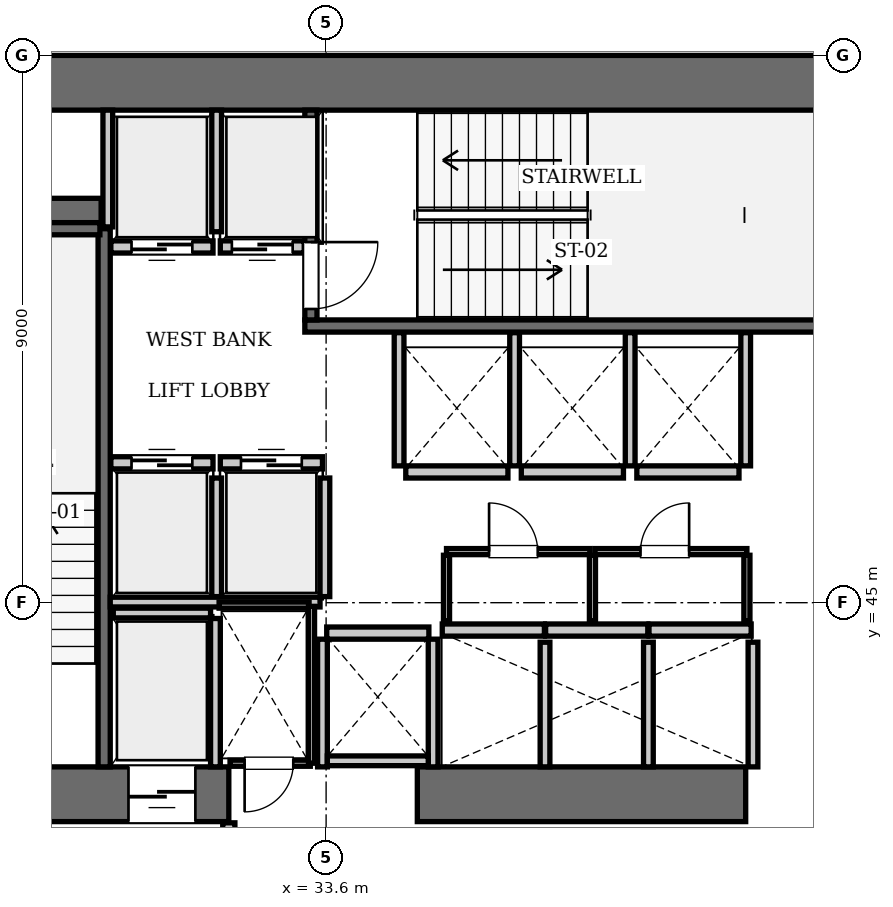
"""IFC4 building model, lengths in metres.
Left out: names, types, materials, properties, quantities, classifications, styles, units other than length and angle.
Written with IfcOpenShell. Run it as: python <this file> out.ifc"""

import sys

from ifc_helpers import new_model, si_unit, direction, frame, frame_2d, origin, place, context, subcontext, project, spatial, rectangle, extrude, element, fill, save


model = new_model("IFC4")
c1 = context("Model", 3, precision=1e-05, world=origin(), true_north=direction((0.0, 1.0)))
c2 = subcontext(c1, "Body", "Model", "MODEL_VIEW")
j1 = project(units=[si_unit("LENGTHUNIT", "METRE"), si_unit("PLANEANGLEUNIT", "RADIAN")], contexts=[c1])
p1 = place(None, origin())
s1 = spatial("IfcSite", under=j1, at=p1, CompositionType="ELEMENT")
p2 = place(p1, origin())
s2 = spatial("IfcBuilding", under=s1, at=p2, CompositionType="ELEMENT")
p3 = place(p2, frame((0.0, 0.0, 26.95)))
s3 = spatial("IfcBuildingStorey", under=s2, at=p3, CompositionType="ELEMENT", Elevation=26.95)
p4 = place(p3, frame((25.2, 53.55, 0.0), z_axis=(0.0, 0.0, 1.0), x_axis=(1.0, 0.0, 0.0)))
e1 = element("IfcWall", 1, at=p4, inside=s3, PredefinedType="SHEAR", context=c2, shape_type="SweptSolid", body=[
    extrude(rectangle(XDim=25.2, YDim=0.9, at=frame_2d((12.6, 0.0))), origin(), (0.0, 0.0, 1.0), 3.85),
])
p5 = place(p3, frame((25.2, 41.85, 0.0), z_axis=(0.0, 0.0, 1.0), x_axis=(1.0, 0.0, 0.0)))
e2 = element("IfcWall", 2, at=p5, inside=s3, PredefinedType="SHEAR", context=c2, shape_type="SweptSolid", body=[
    extrude(rectangle(XDim=6.8, YDim=0.9, at=frame_2d((3.4, 0.0))), origin(), (0.0, 0.0, 1.0), 3.85),
])
p6 = place(p5, frame((1.65, 0.0, 0.0)))
e3 = element("IfcOpeningElement", 3, at=p6, cuts=e2, PredefinedType="OPENING", context=c2, shape_type="SweptSolid", body=[
    extrude(rectangle(XDim=1.15, YDim=2.15, at=frame_2d((0.575, 1.075))), frame((0.0, 0.46, 0.0), z_axis=(0.0, -1.0, 0.0), x_axis=(1.0, 0.0, 0.0)), (0.0, 0.0, 1.0), 0.92),
])
p7 = place(p5, frame((5.15, 0.0, 0.0)))
e4 = element("IfcOpeningElement", 4, at=p7, cuts=e2, PredefinedType="OPENING", context=c2, shape_type="SweptSolid", body=[
    extrude(rectangle(XDim=1.1, YDim=2.2, at=frame_2d((0.55, 1.1))), frame((0.0, 0.46, 0.0), z_axis=(0.0, -1.0, 0.0), x_axis=(1.0, 0.0, 0.0)), (0.0, 0.0, 1.0), 0.92),
])
p8 = place(p3, frame((35.1, 41.85, 0.0), z_axis=(0.0, 0.0, 1.0), x_axis=(1.0, 0.0, 0.0)))
e5 = element("IfcWall", 5, at=p8, inside=s3, PredefinedType="SHEAR", context=c2, shape_type="SweptSolid", body=[
    extrude(rectangle(XDim=5.4, YDim=0.9, at=frame_2d((2.7, 0.0))), origin(), (0.0, 0.0, 1.0), 3.85),
])
p9 = place(p3, frame((26.1, 51.4, 0.0), z_axis=(0.0, 0.0, 1.0), x_axis=(1.0, 0.0, 0.0)))
e6 = element("IfcWall", 6, at=p9, inside=s3, PredefinedType="SHEAR", context=c2, shape_type="SweptSolid", body=[
    extrude(rectangle(XDim=3.8, YDim=0.5, at=frame_2d((1.9, 0.0))), origin(), (0.0, 0.0, 1.0), 3.85),
])
p10 = place(p3, frame((29.95, 42.3, 0.0), z_axis=(0.0, 0.0, 1.0), x_axis=(0.0, 1.0, 0.0)))
e7 = element("IfcWall", 7, at=p10, inside=s3, PredefinedType="SOLIDWALL", context=c2, shape_type="SweptSolid", body=[
    extrude(rectangle(XDim=8.85, YDim=0.2, at=frame_2d((4.425, 0.0))), origin(), (0.0, 0.0, 1.0), 3.61),
])
p11 = place(p3, frame((26.38, 51.15, 0.0), z_axis=(0.0, 0.0, 1.0), x_axis=(1.0, 0.0, 0.0)))
e8 = element("IfcWall", 8, at=p11, inside=s3, PredefinedType="SOLIDWALL", context=c2, shape_type="SweptSolid", body=[
    extrude(rectangle(XDim=3.5, YDim=0.2, at=frame_2d((1.75, 0.0))), origin(), (0.0, 0.0, 1.0), 3.61),
])
p12 = place(p3, frame((33.25, 49.55, 0.0), z_axis=(0.0, 0.0, 1.0), x_axis=(1.0, 0.0, 0.0)))
e9 = element("IfcWall", 9, at=p12, inside=s3, PredefinedType="SOLIDWALL", context=c2, shape_type="SweptSolid", body=[
    extrude(rectangle(XDim=9.1, YDim=0.2, at=frame_2d((4.55, 0.0))), origin(), (0.0, 0.0, 1.0), 3.61),
])
p13 = place(p3, frame((33.35, 49.65, 0.0), z_axis=(0.0, 0.0, 1.0), x_axis=(0.0, 1.0, 0.0)))
e10 = element("IfcWall", 10, at=p13, inside=s3, PredefinedType="SOLIDWALL", context=c2, shape_type="SweptSolid", body=[
    extrude(rectangle(XDim=3.45, YDim=0.2, at=frame_2d((1.725, 0.0))), origin(), (0.0, 0.0, 1.0), 3.61),
])
p14 = place(p13, frame((0.18, 0.0, 0.0)))
e11 = element("IfcOpeningElement", 11, at=p14, cuts=e10, PredefinedType="OPENING", context=c2, shape_type="SweptSolid", body=[
    extrude(rectangle(XDim=1.1, YDim=2.15, at=frame_2d((0.55, 1.075))), frame((0.0, 0.11, 0.0), z_axis=(0.0, -1.0, 0.0), x_axis=(1.0, 0.0, 0.0)), (0.0, 0.0, 1.0), 0.22),
])
p15 = place(p3, frame((30.06, 47.3, 0.0), z_axis=(0.0, 0.0, 1.0), x_axis=(1.0, 0.0, 0.0)))
e12 = element("IfcWall", 12, at=p15, inside=s3, PredefinedType="SOLIDWALL", context=c2, shape_type="SweptSolid", body=[
    extrude(rectangle(XDim=1.68, YDim=0.2, at=frame_2d((0.84, 0.0))), origin(), (0.0, 0.0, 1.0), 3.61),
])
p16 = place(p15, frame((0.34, 0.0, 0.0)))
e13 = element("IfcOpeningElement", 13, at=p16, cuts=e12, PredefinedType="OPENING", context=c2, shape_type="SweptSolid", body=[
    extrude(rectangle(XDim=1.0, YDim=2.15, at=frame_2d((0.5, 1.075))), frame((0.0, 0.11, 0.0), z_axis=(0.0, -1.0, 0.0), x_axis=(1.0, 0.0, 0.0)), (0.0, 0.0, 1.0), 0.22),
])
p17 = place(p3, frame((31.86, 47.3, 0.0), z_axis=(0.0, 0.0, 1.0), x_axis=(1.0, 0.0, 0.0)))
e14 = element("IfcWall", 14, at=p17, inside=s3, PredefinedType="SOLIDWALL", context=c2, shape_type="SweptSolid", body=[
    extrude(rectangle(XDim=1.68, YDim=0.2, at=frame_2d((0.84, 0.0))), origin(), (0.0, 0.0, 1.0), 3.61),
])
p18 = place(p17, frame((0.34, 0.0, 0.0)))
e15 = element("IfcOpeningElement", 15, at=p18, cuts=e14, PredefinedType="OPENING", context=c2, shape_type="SweptSolid", body=[
    extrude(rectangle(XDim=1.0, YDim=2.15, at=frame_2d((0.5, 1.075))), frame((0.0, 0.11, 0.0), z_axis=(0.0, -1.0, 0.0), x_axis=(1.0, 0.0, 0.0)), (0.0, 0.0, 1.0), 0.22),
])
p19 = place(p3, frame((30.06, 50.85, 0.0), z_axis=(0.0, 0.0, 1.0), x_axis=(1.0, 0.0, 0.0)))
e16 = element("IfcWall", 16, at=p19, inside=s3, PredefinedType="SOLIDWALL", context=c2, shape_type="SweptSolid", body=[
    extrude(rectangle(XDim=1.68, YDim=0.2, at=frame_2d((0.84, 0.0))), origin(), (0.0, 0.0, 1.0), 3.61),
])
p20 = place(p19, frame((0.34, 0.0, 0.0)))
e17 = element("IfcOpeningElement", 17, at=p20, cuts=e16, PredefinedType="OPENING", context=c2, shape_type="SweptSolid", body=[
    extrude(rectangle(XDim=1.0, YDim=2.15, at=frame_2d((0.5, 1.075))), frame((0.0, 0.11, 0.0), z_axis=(0.0, -1.0, 0.0), x_axis=(1.0, 0.0, 0.0)), (0.0, 0.0, 1.0), 0.22),
])
p21 = place(p3, frame((31.86, 50.85, 0.0), z_axis=(0.0, 0.0, 1.0), x_axis=(1.0, 0.0, 0.0)))
e18 = element("IfcWall", 18, at=p21, inside=s3, PredefinedType="SOLIDWALL", context=c2, shape_type="SweptSolid", body=[
    extrude(rectangle(XDim=1.38, YDim=0.2, at=frame_2d((0.69, 0.0))), origin(), (0.0, 0.0, 1.0), 3.61),
])
p22 = place(p21, frame((0.19, 0.0, 0.0)))
e19 = element("IfcOpeningElement", 19, at=p22, cuts=e18, PredefinedType="OPENING", context=c2, shape_type="SweptSolid", body=[
    extrude(rectangle(XDim=1.0, YDim=2.15, at=frame_2d((0.5, 1.075))), frame((0.0, 0.11, 0.0), z_axis=(0.0, -1.0, 0.0), x_axis=(1.0, 0.0, 0.0)), (0.0, 0.0, 1.0), 0.22),
])
for number, where, z_axis, x_axis in (
    (20, (35.51, 44.55, 0.0), (0.0, 0.0, 1.0), (1.0, 0.0, 0.0)),
    (21, (37.21, 44.55, 0.0), (0.0, 0.0, 1.0), (1.0, 0.0, 0.0)),
):
    element("IfcWall", number, at=place(p3, frame(where, z_axis=z_axis, x_axis=x_axis)), inside=s3, PredefinedType="SOLIDWALL", context=c2, shape_type="SweptSolid", body=[
        extrude(rectangle(XDim=1.68, YDim=0.2, at=frame_2d((0.84, 0.0))), origin(), (0.0, 0.0, 1.0), 3.61),
    ])
for number, where, z_axis, x_axis in (
    (22, (38.91, 44.55, 0.0), (0.0, 0.0, 1.0), (1.0, 0.0, 0.0)),
    (23, (34.91, 47.15, 0.0), (0.0, 0.0, 1.0), (1.0, 0.0, 0.0)),
):
    element("IfcWall", number, at=place(p3, frame(where, z_axis=z_axis, x_axis=x_axis)), inside=s3, PredefinedType="SOLIDWALL", context=c2, shape_type="SweptSolid", body=[
        extrude(rectangle(XDim=1.68, YDim=0.2, at=frame_2d((0.84, 0.0))), origin(), (0.0, 0.0, 1.0), 3.61),
    ])
for number, where, z_axis, x_axis in (
    (24, (36.81, 47.15, 0.0), (0.0, 0.0, 1.0), (1.0, 0.0, 0.0)),
    (25, (38.71, 47.15, 0.0), (0.0, 0.0, 1.0), (1.0, 0.0, 0.0)),
    (26, (33.61, 44.5, 0.0), (0.0, 0.0, 1.0), (1.0, 0.0, 0.0)),
):
    element("IfcWall", number, at=place(p3, frame(where, z_axis=z_axis, x_axis=x_axis)), inside=s3, PredefinedType="SOLIDWALL", context=c2, shape_type="SweptSolid", body=[
        extrude(rectangle(XDim=1.68, YDim=0.2, at=frame_2d((0.84, 0.0))), origin(), (0.0, 0.0, 1.0), 3.61),
    ])
p23 = place(p3, frame((30.1, 44.83, 0.0), z_axis=(0.0, 0.0, 1.0), x_axis=(1.0, 0.0, 0.0)))
e27 = element("IfcWall", 27, at=p23, inside=s3, PredefinedType="SOLIDWALL", context=c2, shape_type="SweptSolid", body=[
    extrude(rectangle(XDim=1.6, YDim=0.16, at=frame_2d((0.8, 0.0))), origin(), (0.0, 0.0, 1.0), 3.61),
])
p24 = place(p3, frame((31.78, 42.3, 0.0), z_axis=(0.0, 0.0, 1.0), x_axis=(0.0, 1.0, 0.0)))
e28 = element("IfcWall", 28, at=p24, inside=s3, PredefinedType="SOLIDWALL", context=c2, shape_type="SweptSolid", body=[
    extrude(rectangle(XDim=2.44, YDim=0.16, at=frame_2d((1.22, 0.0))), origin(), (0.0, 0.0, 1.0), 3.61),
])
for number, where, z_axis, x_axis in (
    (29, (31.8, 45.1, 0.0), (0.0, 0.0, 1.0), (0.0, 1.0, 0.0)),
    (30, (33.58, 45.1, 0.0), (0.0, 0.0, 1.0), (0.0, 1.0, 0.0)),
):
    element("IfcWall", number, at=place(p3, frame(where, z_axis=z_axis, x_axis=x_axis)), inside=s3, PredefinedType="SOLIDWALL", context=c2, shape_type="SweptSolid", body=[
        extrude(rectangle(XDim=1.95, YDim=0.16, at=frame_2d((0.975, 0.0))), origin(), (0.0, 0.0, 1.0), 3.61),
    ])
p25 = place(p3, frame((30.05, 45.01, 0.0), z_axis=(0.0, 0.0, 1.0), x_axis=(1.0, 0.0, 0.0)))
e31 = element("IfcWall", 31, at=p25, inside=s3, PredefinedType="SOLIDWALL", context=c2, shape_type="SweptSolid", body=[
    extrude(rectangle(XDim=3.45, YDim=0.16, at=frame_2d((1.725, 0.0))), origin(), (0.0, 0.0, 1.0), 3.61),
])
p26 = place(p3, frame((30.01, 51.18, 0.0), z_axis=(0.0, 0.0, 1.0), x_axis=(0.0, 1.0, 0.0)))
e32 = element("IfcWall", 32, at=p26, inside=s3, PredefinedType="SOLIDWALL", context=c2, shape_type="SweptSolid", body=[
    extrude(rectangle(XDim=1.92, YDim=0.16, at=frame_2d((0.96, 0.0))), origin(), (0.0, 0.0, 1.0), 3.61),
])
p27 = place(p3, frame((31.8, 51.1, 0.0), z_axis=(0.0, 0.0, 1.0), x_axis=(0.0, 1.0, 0.0)))
e33 = element("IfcWall", 33, at=p27, inside=s3, PredefinedType="SOLIDWALL", context=c2, shape_type="SweptSolid", body=[
    extrude(rectangle(XDim=2.0, YDim=0.16, at=frame_2d((1.0, 0.0))), origin(), (0.0, 0.0, 1.0), 3.61),
])
for number, where, z_axis, x_axis in (
    (34, (37.2, 42.3, 0.0), (0.0, 0.0, 1.0), (0.0, 1.0, 0.0)),
    (35, (38.9, 42.3, 0.0), (0.0, 0.0, 1.0), (0.0, 1.0, 0.0)),
    (36, (40.62, 42.3, 0.0), (0.0, 0.0, 1.0), (0.0, 1.0, 0.0)),
):
    element("IfcWall", number, at=place(p3, frame(where, z_axis=z_axis, x_axis=x_axis)), inside=s3, PredefinedType="SOLIDWALL", context=c2, shape_type="SweptSolid", body=[
        extrude(rectangle(XDim=2.05, YDim=0.16, at=frame_2d((1.025, 0.0))), origin(), (0.0, 0.0, 1.0), 3.61),
    ])
for number, where, z_axis, x_axis in (
    (37, (34.8, 47.25, 0.0), (0.0, 0.0, 1.0), (0.0, 1.0, 0.0)),
    (38, (36.7, 47.25, 0.0), (0.0, 0.0, 1.0), (0.0, 1.0, 0.0)),
    (39, (38.6, 47.25, 0.0), (0.0, 0.0, 1.0), (0.0, 1.0, 0.0)),
    (40, (40.5, 47.25, 0.0), (0.0, 0.0, 1.0), (0.0, 1.0, 0.0)),
):
    element("IfcWall", number, at=place(p3, frame(where, z_axis=z_axis, x_axis=x_axis)), inside=s3, PredefinedType="SOLIDWALL", context=c2, shape_type="SweptSolid", body=[
        extrude(rectangle(XDim=2.19, YDim=0.16, at=frame_2d((1.095, 0.0))), origin(), (0.0, 0.0, 1.0), 3.61),
    ])
for number, where, z_axis, x_axis in (
    (41, (33.54, 42.3, 0.0), (0.0, 0.0, 1.0), (0.0, 1.0, 0.0)),
    (42, (35.36, 42.3, 0.0), (0.0, 0.0, 1.0), (0.0, 1.0, 0.0)),
):
    element("IfcWall", number, at=place(p3, frame(where, z_axis=z_axis, x_axis=x_axis)), inside=s3, PredefinedType="SOLIDWALL", context=c2, shape_type="SweptSolid", body=[
        extrude(rectangle(XDim=2.1, YDim=0.16, at=frame_2d((1.05, 0.0))), origin(), (0.0, 0.0, 1.0), 3.61),
    ])
p28 = place(p3, frame((33.62, 42.4, 0.0), z_axis=(0.0, 0.0, 1.0), x_axis=(1.0, 0.0, 0.0)))
e43 = element("IfcWall", 43, at=p28, inside=s3, PredefinedType="SOLIDWALL", context=c2, shape_type="SweptSolid", body=[
    extrude(rectangle(XDim=1.66, YDim=0.16, at=frame_2d((0.83, 0.0))), origin(), (0.0, 0.0, 1.0), 3.61),
])
p29 = place(p3, frame((32.0, 38.31, 0.0), z_axis=(0.0, 0.0, 1.0), x_axis=(0.0, 1.0, 0.0)))
e44 = element("IfcWall", 44, at=p29, inside=s3, PredefinedType="PARTITIONING", context=c2, shape_type="SweptSolid", body=[
    extrude(rectangle(XDim=3.07, YDim=0.2, at=frame_2d((1.535, 0.0))), origin(), (0.0, 0.0, 1.0), 3.61),
])
p30 = place(p3, frame((32.02, 42.36, 0.0), z_axis=(0.0, 0.0, 1.0), x_axis=(1.0, 0.0, 0.0)))
e45 = element("IfcWall", 45, at=p30, inside=s3, PredefinedType="PARTITIONING", context=c2, shape_type="SweptSolid", body=[
    extrude(rectangle(XDim=1.32, YDim=0.1, at=frame_2d((0.66, 0.0))), origin(), (0.0, 0.0, 1.0), 3.61),
])
p31 = place(p30, frame((0.24, 0.0, 0.0)))
e46 = element("IfcOpeningElement", 46, at=p31, cuts=e45, PredefinedType="OPENING", context=c2, shape_type="SweptSolid", body=[
    extrude(rectangle(XDim=0.8, YDim=2.05, at=frame_2d((0.4, 1.025))), frame((0.0, 0.06, 0.0), z_axis=(0.0, -1.0, 0.0), x_axis=(1.0, 0.0, 0.0)), (0.0, 0.0, 1.0), 0.12),
])
p32 = place(p3, frame((31.84, 44.96, 0.0), z_axis=(0.0, 0.0, 1.0), x_axis=(1.0, 0.0, 0.0)))
e47 = element("IfcWall", 47, at=p32, inside=s3, PredefinedType="PARTITIONING", context=c2, shape_type="SweptSolid", body=[
    extrude(rectangle(XDim=1.48, YDim=0.1, at=frame_2d((0.74, 0.0))), origin(), (0.0, 0.0, 1.0), 3.61),
])
p33 = place(p3, frame((33.36, 42.36, 0.0), z_axis=(0.0, 0.0, 1.0), x_axis=(0.0, 1.0, 0.0)))
e48 = element("IfcWall", 48, at=p33, inside=s3, PredefinedType="PARTITIONING", context=c2, shape_type="SweptSolid", body=[
    extrude(rectangle(XDim=2.58, YDim=0.1, at=frame_2d((1.29, 0.0))), origin(), (0.0, 0.0, 1.0), 3.61),
])
p34 = place(p3, frame((35.58, 45.84, 0.0), z_axis=(0.0, 0.0, 1.0), x_axis=(1.0, 0.0, 0.0)))
e49 = element("IfcWall", 49, at=p34, inside=s3, PredefinedType="PARTITIONING", context=c2, shape_type="SweptSolid", body=[
    extrude(rectangle(XDim=2.36, YDim=0.1, at=frame_2d((1.18, 0.0))), origin(), (0.0, 0.0, 1.0), 3.61),
])
p35 = place(p34, frame((0.7, 0.0, 0.0)))
e50 = element("IfcOpeningElement", 50, at=p35, cuts=e49, PredefinedType="OPENING", context=c2, shape_type="SweptSolid", body=[
    extrude(rectangle(XDim=0.8, YDim=2.05, at=frame_2d((0.4, 1.025))), frame((0.0, 0.06, 0.0), z_axis=(0.0, -1.0, 0.0), x_axis=(1.0, 0.0, 0.0)), (0.0, 0.0, 1.0), 0.12),
])
p36 = place(p3, frame((38.02, 45.84, 0.0), z_axis=(0.0, 0.0, 1.0), x_axis=(1.0, 0.0, 0.0)))
e51 = element("IfcWall", 51, at=p36, inside=s3, PredefinedType="PARTITIONING", context=c2, shape_type="SweptSolid", body=[
    extrude(rectangle(XDim=2.5, YDim=0.1, at=frame_2d((1.25, 0.0))), origin(), (0.0, 0.0, 1.0), 3.61),
])
p37 = place(p36, frame((0.75, 0.0, 0.0)))
e52 = element("IfcOpeningElement", 52, at=p37, cuts=e51, PredefinedType="OPENING", context=c2, shape_type="SweptSolid", body=[
    extrude(rectangle(XDim=0.8, YDim=2.05, at=frame_2d((0.4, 1.025))), frame((0.0, 0.06, 0.0), z_axis=(0.0, -1.0, 0.0), x_axis=(1.0, 0.0, 0.0)), (0.0, 0.0, 1.0), 0.12),
])
for number, where, z_axis, x_axis in (
    (53, (35.58, 44.7, 0.0), (0.0, 0.0, 1.0), (0.0, 1.0, 0.0)),
    (54, (37.98, 44.7, 0.0), (0.0, 0.0, 1.0), (0.0, 1.0, 0.0)),
    (55, (40.52, 44.7, 0.0), (0.0, 0.0, 1.0), (0.0, 1.0, 0.0)),
):
    element("IfcWall", number, at=place(p3, frame(where, z_axis=z_axis, x_axis=x_axis)), inside=s3, PredefinedType="PARTITIONING", context=c2, shape_type="SweptSolid", body=[
        extrude(rectangle(XDim=1.08, YDim=0.1, at=frame_2d((0.54, 0.0))), origin(), (0.0, 0.0, 1.0), 3.61),
    ])
p38 = place(p14, frame((1.1, 0.0, 0.0), z_axis=(0.0, 0.0, 1.0), x_axis=(-1.0, 0.0, 0.0)))
e56 = element("IfcDoor", 56, at=p38, inside=s3, OperationType="SINGLE_SWING_LEFT", PredefinedType="DOOR", context=c2, shape_type="SweptSolid", body=[
    extrude(rectangle(XDim=1.1, YDim=2.15, at=frame_2d((0.55, 1.075))), frame((0.0, 0.025, 0.0), z_axis=(0.0, -1.0, 0.0), x_axis=(1.0, 0.0, 0.0)), (0.0, 0.0, 1.0), 0.05),
])
fill(e11, e56)
p39 = place(p16, origin())
e57 = element("IfcDoor", 57, at=p39, inside=s3, OperationType="SLIDING_TO_LEFT", PredefinedType="DOOR", context=c2, shape_type="SweptSolid", body=[
    extrude(rectangle(XDim=1.0, YDim=2.15, at=frame_2d((0.5, 1.075))), frame((0.0, 0.025, 0.0), z_axis=(0.0, -1.0, 0.0), x_axis=(1.0, 0.0, 0.0)), (0.0, 0.0, 1.0), 0.05),
])
fill(e13, e57)
p40 = place(p18, origin())
e58 = element("IfcDoor", 58, at=p40, inside=s3, OperationType="SLIDING_TO_LEFT", PredefinedType="DOOR", context=c2, shape_type="SweptSolid", body=[
    extrude(rectangle(XDim=1.0, YDim=2.15, at=frame_2d((0.5, 1.075))), frame((0.0, 0.025, 0.0), z_axis=(0.0, -1.0, 0.0), x_axis=(1.0, 0.0, 0.0)), (0.0, 0.0, 1.0), 0.05),
])
fill(e15, e58)
p41 = place(p20, frame((1.0, 0.0, 0.0), z_axis=(0.0, 0.0, 1.0), x_axis=(-1.0, 0.0, 0.0)))
e59 = element("IfcDoor", 59, at=p41, inside=s3, OperationType="SLIDING_TO_LEFT", PredefinedType="DOOR", context=c2, shape_type="SweptSolid", body=[
    extrude(rectangle(XDim=1.0, YDim=2.15, at=frame_2d((0.5, 1.075))), frame((0.0, 0.025, 0.0), z_axis=(0.0, -1.0, 0.0), x_axis=(1.0, 0.0, 0.0)), (0.0, 0.0, 1.0), 0.05),
])
fill(e17, e59)
p42 = place(p22, frame((1.0, 0.0, 0.0), z_axis=(0.0, 0.0, 1.0), x_axis=(-1.0, 0.0, 0.0)))
e60 = element("IfcDoor", 60, at=p42, inside=s3, OperationType="SLIDING_TO_LEFT", PredefinedType="DOOR", context=c2, shape_type="SweptSolid", body=[
    extrude(rectangle(XDim=1.0, YDim=2.15, at=frame_2d((0.5, 1.075))), frame((0.0, 0.025, 0.0), z_axis=(0.0, -1.0, 0.0), x_axis=(1.0, 0.0, 0.0)), (0.0, 0.0, 1.0), 0.05),
])
fill(e19, e60)
p43 = place(p7, frame((1.1, 0.0, 0.0), z_axis=(0.0, 0.0, 1.0), x_axis=(-1.0, 0.0, 0.0)))
e61 = element("IfcDoor", 61, at=p43, inside=s3, OperationType="SLIDING_TO_LEFT", PredefinedType="DOOR", context=c2, shape_type="SweptSolid", body=[
    extrude(rectangle(XDim=1.1, YDim=2.2, at=frame_2d((0.55, 1.1))), frame((0.0, 0.025, 0.0), z_axis=(0.0, -1.0, 0.0), x_axis=(1.0, 0.0, 0.0)), (0.0, 0.0, 1.0), 0.05),
])
fill(e4, e61)
p44 = place(p31, frame((0.8, 0.0, 0.0), z_axis=(0.0, 0.0, 1.0), x_axis=(-1.0, 0.0, 0.0)))
e62 = element("IfcDoor", 62, at=p44, inside=s3, OperationType="SINGLE_SWING_RIGHT", PredefinedType="DOOR", context=c2, shape_type="SweptSolid", body=[
    extrude(rectangle(XDim=0.8, YDim=2.05, at=frame_2d((0.4, 1.025))), frame((0.0, 0.025, 0.0), z_axis=(0.0, -1.0, 0.0), x_axis=(1.0, 0.0, 0.0)), (0.0, 0.0, 1.0), 0.05),
])
fill(e46, e62)
p45 = place(p35, origin())
e63 = element("IfcDoor", 63, at=p45, inside=s3, OperationType="SINGLE_SWING_LEFT", PredefinedType="DOOR", context=c2, shape_type="SweptSolid", body=[
    extrude(rectangle(XDim=0.8, YDim=2.05, at=frame_2d((0.4, 1.025))), frame((0.0, 0.025, 0.0), z_axis=(0.0, -1.0, 0.0), x_axis=(1.0, 0.0, 0.0)), (0.0, 0.0, 1.0), 0.05),
])
fill(e50, e63)
p46 = place(p37, origin())
e64 = element("IfcDoor", 64, at=p46, inside=s3, OperationType="SINGLE_SWING_RIGHT", PredefinedType="DOOR", context=c2, shape_type="SweptSolid", body=[
    extrude(rectangle(XDim=0.8, YDim=2.05, at=frame_2d((0.4, 1.025))), frame((0.0, 0.025, 0.0), z_axis=(0.0, -1.0, 0.0), x_axis=(1.0, 0.0, 0.0)), (0.0, 0.0, 1.0), 0.05),
])
fill(e52, e64)
save(model, sys.argv[1])
